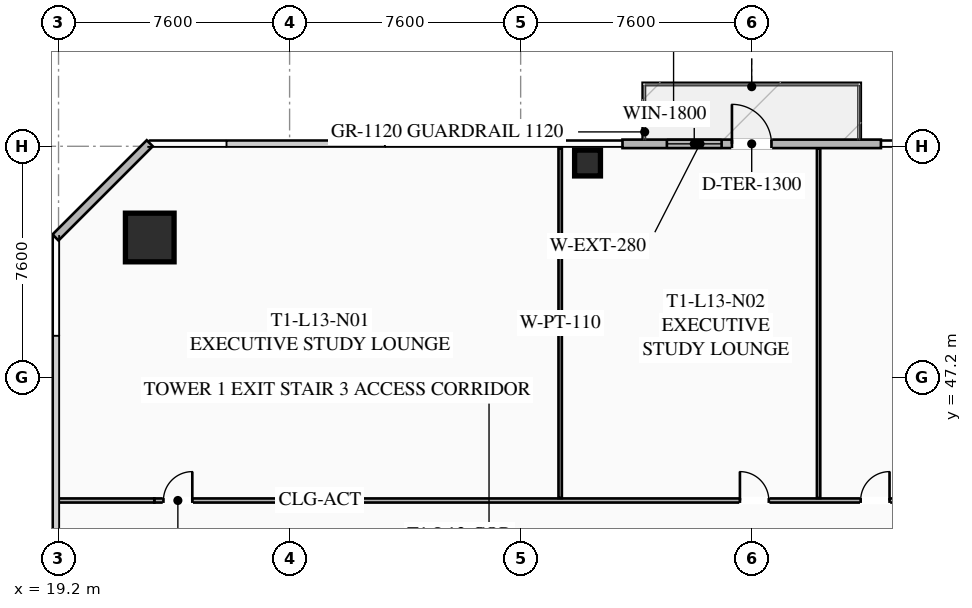
"""IFC4 building model, lengths in metres.
Left out: names, types, materials, properties, quantities, classifications, styles, units other than length and angle.
Written with IfcOpenShell. Run it as: python <this file> out.ifc"""

import sys

from ifc_helpers import new_model, si_unit, direction, frame, frame_2d, origin, origin_2d, place, context, subcontext, project, spatial, rectangle, hollow_rectangle, extrude, element, fill, save


model = new_model("IFC4")
c1 = context("Model", 3, precision=1e-05, world=origin(), true_north=direction((0.0, 1.0)))
c2 = subcontext(c1, "Body", "Model", "MODEL_VIEW")
j1 = project(units=[si_unit("LENGTHUNIT", "METRE"), si_unit("PLANEANGLEUNIT", "RADIAN")], contexts=[c1])
p1 = place(None, origin())
s1 = spatial("IfcSite", under=j1, at=p1, CompositionType="ELEMENT")
p2 = place(p1, origin())
s2 = spatial("IfcBuilding", under=s1, at=p2, CompositionType="ELEMENT")
p3 = place(p2, frame((0.0, 0.0, 53.0)))
s3 = spatial("IfcBuildingStorey", under=s2, at=p3, CompositionType="ELEMENT", Elevation=53.0)
p4 = place(p3, frame((22.2, 51.8, 0.0), z_axis=(0.0, 0.0, 1.0), x_axis=(1.0, 0.0, 0.0)))
e1 = element("IfcColumn", 1, at=p4, inside=s3, PredefinedType="COLUMN", context=c2, shape_type="SweptSolid", body=[
    extrude(hollow_rectangle(XDim=1.6, YDim=1.6, WallThickness=0.06, at=origin_2d()), origin(), (0.0, 0.0, 1.0), 3.35),
])
p5 = place(p3, frame((36.6, 54.25, 0.0), z_axis=(0.0, 0.0, 1.0), x_axis=(1.0, 0.0, 0.0)))
e2 = element("IfcColumn", 2, at=p5, inside=s3, PredefinedType="COLUMN", context=c2, shape_type="SweptSolid", body=[
    extrude(hollow_rectangle(XDim=0.85, YDim=0.85, WallThickness=0.035, at=origin_2d()), origin(), (0.0, 0.0, 1.0), 3.35),
])
p6 = place(p3, frame((37.75, 54.88, 0.0), z_axis=(0.0, 0.0, 1.0), x_axis=(1.0, 0.0, 0.0)))
e3 = element("IfcWall", 3, at=p6, inside=s3, PredefinedType="SOLIDWALL", context=c2, shape_type="SweptSolid", body=[
    extrude(rectangle(XDim=8.5, YDim=0.28, at=frame_2d((4.25, 0.0))), origin(), (0.0, 0.0, 1.0), 3.35),
])
p7 = place(p6, frame((3.6, 0.0, 0.0)))
e4 = element("IfcOpeningElement", 4, at=p7, cuts=e3, PredefinedType="OPENING", context=c2, shape_type="SweptSolid", body=[
    extrude(rectangle(XDim=1.3, YDim=2.15, at=frame_2d((0.65, 1.075))), frame((0.0, 0.15, 0.0), z_axis=(0.0, -1.0, 0.0), x_axis=(1.0, 0.0, 0.0)), (0.0, 0.0, 1.0), 0.3),
])
p8 = place(p6, frame((1.46, 0.0, 0.85)))
e5 = element("IfcOpeningElement", 5, at=p8, cuts=e3, PredefinedType="OPENING", context=c2, shape_type="SweptSolid", body=[
    extrude(rectangle(XDim=1.8, YDim=1.92, at=frame_2d((0.9, 0.96))), frame((0.0, 0.15, 0.0), z_axis=(0.0, -1.0, 0.0), x_axis=(1.0, 0.0, 0.0)), (0.0, 0.0, 1.0), 0.3),
])
p9 = place(p3, frame((19.1, 51.8, 0.0), z_axis=(0.0, 0.0, 1.0), x_axis=(0.707106781187, 0.707106781187, 0.0)))
e6 = element("IfcWall", 6, at=p9, inside=s3, PredefinedType="SOLIDWALL", context=c2, shape_type="SweptSolid", body=[
    extrude(rectangle(XDim=4.384, YDim=0.28, at=frame_2d((2.192, 0.0))), origin(), (0.0, 0.0, 1.0), 3.35),
])
p10 = place(p3, frame((22.35, 43.15, 0.0), z_axis=(0.0, 0.0, 1.0), x_axis=(1.0, 0.0, 0.0)))
e7 = element("IfcWall", 7, at=p10, inside=s3, PredefinedType="PARTITIONING", context=c2, shape_type="SweptSolid", body=[
    extrude(rectangle(XDim=29.0, YDim=0.135, at=frame_2d((14.5, 0.0))), origin(), (0.0, 0.0, 1.0), 2.703),
])
p11 = place(p10, frame((0.3, 0.0, 0.0)))
e8 = element("IfcOpeningElement", 8, at=p11, cuts=e7, PredefinedType="OPENING", context=c2, shape_type="SweptSolid", body=[
    extrude(rectangle(XDim=0.95, YDim=2.05, at=frame_2d((0.475, 1.025))), frame((0.0, 0.077, 0.0), z_axis=(0.0, -1.0, 0.0), x_axis=(1.0, 0.0, 0.0)), (0.0, 0.0, 1.0), 0.155),
])
p12 = place(p10, frame((19.263, 0.0, 0.0)))
e9 = element("IfcOpeningElement", 9, at=p12, cuts=e7, PredefinedType="OPENING", context=c2, shape_type="SweptSolid", body=[
    extrude(rectangle(XDim=0.95, YDim=2.05, at=frame_2d((0.475, 1.025))), frame((0.0, 0.077, 0.0), z_axis=(0.0, -1.0, 0.0), x_axis=(1.0, 0.0, 0.0)), (0.0, 0.0, 1.0), 0.155),
])
p13 = place(p10, frame((23.234, 0.0, 0.0)))
e10 = element("IfcOpeningElement", 10, at=p13, cuts=e7, PredefinedType="OPENING", context=c2, shape_type="SweptSolid", body=[
    extrude(rectangle(XDim=0.95, YDim=2.05, at=frame_2d((0.475, 1.025))), frame((0.0, 0.077, 0.0), z_axis=(0.0, -1.0, 0.0), x_axis=(1.0, 0.0, 0.0)), (0.0, 0.0, 1.0), 0.155),
])
p14 = place(p3, frame((19.12, 43.15, 0.0), z_axis=(0.0, 0.0, 1.0), x_axis=(1.0, 0.0, 0.0)))
e11 = element("IfcWall", 11, at=p14, inside=s3, PredefinedType="PARTITIONING", context=c2, shape_type="SweptSolid", body=[
    extrude(rectangle(XDim=3.23, YDim=0.135, at=frame_2d((1.615, 0.0))), origin(), (0.0, 0.0, 1.0), 2.703),
])
for number, where, z_axis, x_axis in (
    (12, (35.7, 43.23, 0.0), (0.0, 0.0, 1.0), (0.0, 1.0, 0.0)),
    (13, (44.2, 43.23, 0.0), (0.0, 0.0, 1.0), (0.0, 1.0, 0.0)),
):
    element("IfcWall", number, at=place(p3, frame(where, z_axis=z_axis, x_axis=x_axis)), inside=s3, PredefinedType="PARTITIONING", context=c2, shape_type="SweptSolid", body=[
        extrude(rectangle(XDim=11.5, YDim=0.11, at=frame_2d((5.75, 0.0))), origin(), (0.0, 0.0, 1.0), 2.703),
    ])
p15 = place(p7, origin())
e14 = element("IfcDoor", 14, at=p15, inside=s3, OperationType="SINGLE_SWING_LEFT", PredefinedType="DOOR", context=c2, shape_type="SweptSolid", body=[
    extrude(rectangle(XDim=1.3, YDim=2.15, at=frame_2d((0.65, 1.075))), frame((0.0, 0.025, 0.0), z_axis=(0.0, -1.0, 0.0), x_axis=(1.0, 0.0, 0.0)), (0.0, 0.0, 1.0), 0.05),
])
fill(e4, e14)
p16 = place(p8, origin())
e15 = element("IfcWindow", 15, at=p16, inside=s3, PartitioningType="SINGLE_PANEL", PredefinedType="WINDOW", context=c2, shape_type="SweptSolid", body=[
    extrude(rectangle(XDim=1.8, YDim=1.92, at=frame_2d((0.9, 0.96))), frame((0.0, 0.03, 0.0), z_axis=(0.0, -1.0, 0.0), x_axis=(1.0, 0.0, 0.0)), (0.0, 0.0, 1.0), 0.06),
])
fill(e5, e15)
p17 = place(p11, origin())
e16 = element("IfcDoor", 16, at=p17, inside=s3, OperationType="SINGLE_SWING_RIGHT", PredefinedType="DOOR", context=c2, shape_type="SweptSolid", body=[
    extrude(rectangle(XDim=0.95, YDim=2.05, at=frame_2d((0.475, 1.025))), frame((0.0, 0.025, 0.0), z_axis=(0.0, -1.0, 0.0), x_axis=(1.0, 0.0, 0.0)), (0.0, 0.0, 1.0), 0.05),
])
fill(e8, e16)
p18 = place(p12, origin())
e17 = element("IfcDoor", 17, at=p18, inside=s3, OperationType="SINGLE_SWING_LEFT", PredefinedType="DOOR", context=c2, shape_type="SweptSolid", body=[
    extrude(rectangle(XDim=0.95, YDim=2.05, at=frame_2d((0.475, 1.025))), frame((0.0, 0.025, 0.0), z_axis=(0.0, -1.0, 0.0), x_axis=(1.0, 0.0, 0.0)), (0.0, 0.0, 1.0), 0.05),
])
fill(e9, e17)
p19 = place(p13, origin())
e18 = element("IfcDoor", 18, at=p19, inside=s3, OperationType="SINGLE_SWING_RIGHT", PredefinedType="DOOR", context=c2, shape_type="SweptSolid", body=[
    extrude(rectangle(XDim=0.95, YDim=2.05, at=frame_2d((0.475, 1.025))), frame((0.0, 0.025, 0.0), z_axis=(0.0, -1.0, 0.0), x_axis=(1.0, 0.0, 0.0)), (0.0, 0.0, 1.0), 0.05),
])
fill(e10, e18)
save(model, sys.argv[1])
